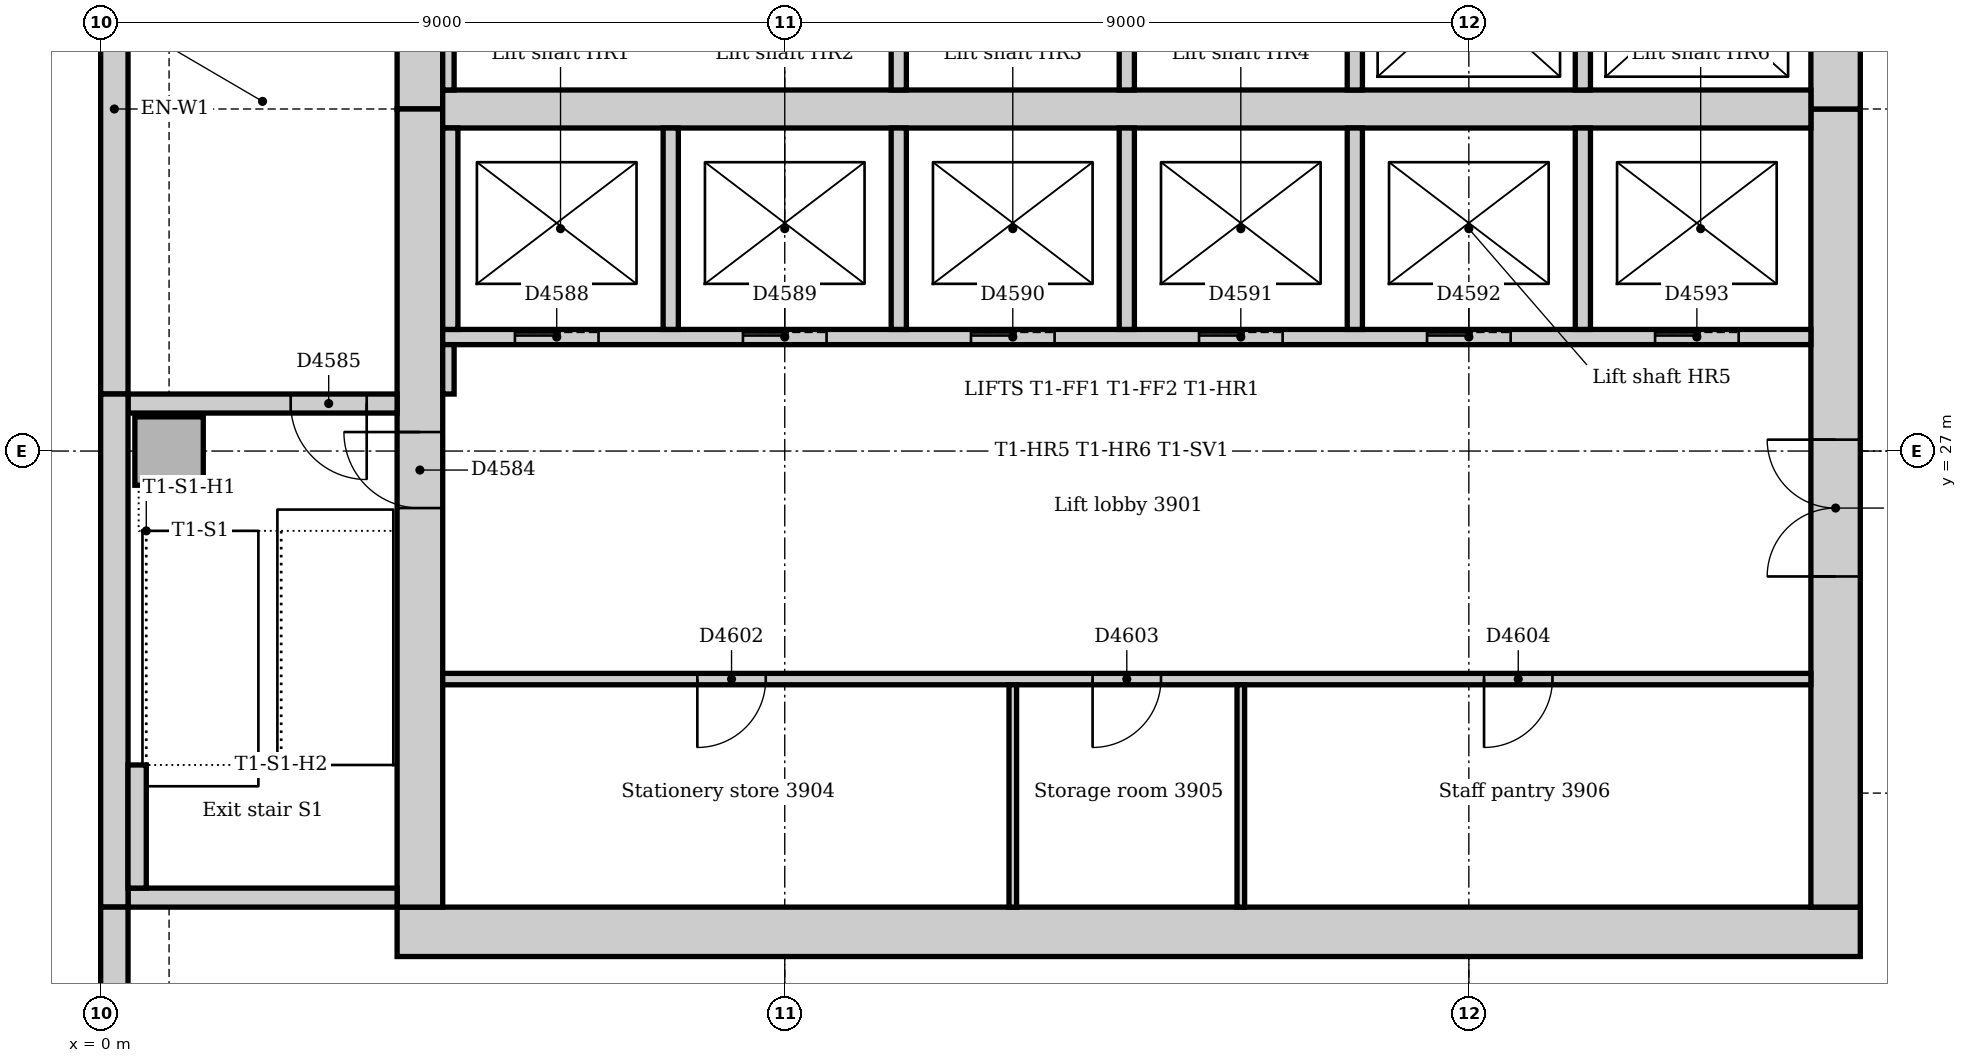
"""IFC4 building model, lengths in metres.
Left out: names, types, materials, properties, quantities, classifications, styles, units other than length and angle.
Written with IfcOpenShell. Run it as: python <this file> out.ifc"""

import sys

from ifc_helpers import new_model, si_unit, direction, frame, frame_2d, origin, origin_2d, place, context, subcontext, project, spatial, rectangle, extrude, element, fill, save


model = new_model("IFC4")
c1 = context("Model", 3, precision=1e-05, world=origin(), true_north=direction((0.0, 1.0)))
c2 = subcontext(c1, "Body", "Model", "MODEL_VIEW")
j1 = project(units=[si_unit("LENGTHUNIT", "METRE"), si_unit("PLANEANGLEUNIT", "RADIAN")], contexts=[c1])
p1 = place(None, origin())
s1 = spatial("IfcSite", under=j1, at=p1, CompositionType="ELEMENT")
p2 = place(p1, origin())
s2 = spatial("IfcBuilding", under=s1, at=p2, CompositionType="ELEMENT")
p3 = place(p2, frame((0.0, 0.0, 165.0)))
s3 = spatial("IfcBuildingStorey", under=s2, at=p3, CompositionType="ELEMENT", Elevation=165.0)
p4 = place(p3, frame((3.9, 20.675, 0.0), z_axis=(0.0, 0.0, 1.0), x_axis=(1.0, 0.0, 0.0)))
e1 = element("IfcWall", 1, at=p4, inside=s3, PredefinedType="SOLIDWALL", context=c2, shape_type="SweptSolid", body=[
    extrude(rectangle(XDim=19.25, YDim=0.65, at=frame_2d((9.625, 0.0))), origin(), (0.0, 0.0, 1.0), 4.0),
])
p5 = place(p3, frame((22.825, 21.0, 0.0), z_axis=(0.0, 0.0, 1.0), x_axis=(0.0, 1.0, 0.0)))
e2 = element("IfcWall", 2, at=p5, inside=s3, PredefinedType="SOLIDWALL", context=c2, shape_type="SweptSolid", body=[
    extrude(rectangle(XDim=10.5, YDim=0.65, at=frame_2d((5.25, 0.0))), origin(), (0.0, 0.0, 1.0), 4.0),
])
p6 = place(p5, frame((4.35, 0.0, 0.0)))
e3 = element("IfcOpeningElement", 3, at=p6, cuts=e2, PredefinedType="OPENING", context=c2, shape_type="SweptSolid", body=[
    extrude(rectangle(XDim=1.8, YDim=2.1, at=frame_2d((0.9, 1.05))), frame((0.0, 0.335, 0.0), z_axis=(0.0, -1.0, 0.0), x_axis=(1.0, 0.0, 0.0)), (0.0, 0.0, 1.0), 0.67),
])
p7 = place(p3, frame((22.825, 31.5, 0.0), z_axis=(0.0, 0.0, 1.0), x_axis=(0.0, 1.0, 0.0)))
e4 = element("IfcWall", 4, at=p7, inside=s3, PredefinedType="SOLIDWALL", context=c2, shape_type="SweptSolid", body=[
    extrude(rectangle(XDim=10.5, YDim=0.65, at=frame_2d((5.25, 0.0))), origin(), (0.0, 0.0, 1.0), 4.0),
])
p8 = place(p7, frame((3.15, 0.0, 0.0)))
e5 = element("IfcOpeningElement", 5, at=p8, cuts=e4, PredefinedType="OPENING", context=c2, shape_type="SweptSolid", body=[
    extrude(rectangle(XDim=1.0, YDim=2.1, at=frame_2d((0.5, 1.05))), frame((0.0, 0.335, 0.0), z_axis=(0.0, -1.0, 0.0), x_axis=(1.0, 0.0, 0.0)), (0.0, 0.0, 1.0), 0.67),
])
p9 = place(p7, frame((5.2, 0.0, 0.0)))
e6 = element("IfcOpeningElement", 6, at=p9, cuts=e4, PredefinedType="OPENING", context=c2, shape_type="SweptSolid", body=[
    extrude(rectangle(XDim=1.0, YDim=2.1, at=frame_2d((0.5, 1.05))), frame((0.0, 0.335, 0.0), z_axis=(0.0, -1.0, 0.0), x_axis=(1.0, 0.0, 0.0)), (0.0, 0.0, 1.0), 0.67),
])
p10 = place(p3, frame((4.2, 42.0, 0.0), z_axis=(0.0, 0.0, 1.0), x_axis=(0.0, -1.0, 0.0)))
e7 = element("IfcWall", 7, at=p10, inside=s3, PredefinedType="SOLIDWALL", context=c2, shape_type="SweptSolid", body=[
    extrude(rectangle(XDim=10.5, YDim=0.6, at=frame_2d((5.25, 0.0))), origin(), (0.0, 0.0, 1.0), 4.0),
])
p11 = place(p10, frame((5.3, 0.0, 0.0)))
e8 = element("IfcOpeningElement", 8, at=p11, cuts=e7, PredefinedType="OPENING", context=c2, shape_type="SweptSolid", body=[
    extrude(rectangle(XDim=1.0, YDim=2.1, at=frame_2d((0.5, 1.05))), frame((0.0, 0.31, 0.0), z_axis=(0.0, -1.0, 0.0), x_axis=(1.0, 0.0, 0.0)), (0.0, 0.0, 1.0), 0.62),
])
p12 = place(p3, frame((4.2, 31.5, 0.0), z_axis=(0.0, 0.0, 1.0), x_axis=(0.0, -1.0, 0.0)))
e9 = element("IfcWall", 9, at=p12, inside=s3, PredefinedType="SOLIDWALL", context=c2, shape_type="SweptSolid", body=[
    extrude(rectangle(XDim=10.5, YDim=0.6, at=frame_2d((5.25, 0.0))), origin(), (0.0, 0.0, 1.0), 4.0),
])
p13 = place(p12, frame((4.25, 0.0, 0.0)))
e10 = element("IfcOpeningElement", 10, at=p13, cuts=e9, PredefinedType="OPENING", context=c2, shape_type="SweptSolid", body=[
    extrude(rectangle(XDim=1.0, YDim=2.1, at=frame_2d((0.5, 1.05))), frame((0.0, 0.31, 0.0), z_axis=(0.0, -1.0, 0.0), x_axis=(1.0, 0.0, 0.0)), (0.0, 0.0, 1.0), 0.62),
])
p14 = place(p3, frame((4.5, 31.5, 0.0), z_axis=(0.0, 0.0, 1.0), x_axis=(1.0, 0.0, 0.0)))
e11 = element("IfcWall", 11, at=p14, inside=s3, PredefinedType="SOLIDWALL", context=c2, shape_type="SweptSolid", body=[
    extrude(rectangle(XDim=18.0, YDim=0.5, at=frame_2d((9.0, 0.0))), origin(), (0.0, 0.0, 1.0), 4.0),
])
p15 = place(p3, frame((0.36, 21.125, 0.0), z_axis=(0.0, 0.0, 1.0), x_axis=(1.0, 0.0, 0.0)))
e12 = element("IfcWall", 12, at=p15, inside=s3, PredefinedType="SOLIDWALL", context=c2, shape_type="SweptSolid", body=[
    extrude(rectangle(XDim=3.54, YDim=0.25, at=frame_2d((1.77, 0.0))), origin(), (0.0, 0.0, 1.0), 4.0),
])
p16 = place(p3, frame((3.9, 27.625, 0.0), z_axis=(0.0, 0.0, 1.0), x_axis=(-1.0, 0.0, 0.0)))
e13 = element("IfcWall", 13, at=p16, inside=s3, PredefinedType="SOLIDWALL", context=c2, shape_type="SweptSolid", body=[
    extrude(rectangle(XDim=3.54, YDim=0.25, at=frame_2d((1.77, 0.0))), origin(), (0.0, 0.0, 1.0), 4.0),
])
p17 = place(p16, frame((0.4, 0.0, 0.0)))
e14 = element("IfcOpeningElement", 14, at=p17, cuts=e13, PredefinedType="OPENING", context=c2, shape_type="SweptSolid", body=[
    extrude(rectangle(XDim=1.0, YDim=2.1, at=frame_2d((0.5, 1.05))), frame((0.0, 0.135, 0.0), z_axis=(0.0, -1.0, 0.0), x_axis=(1.0, 0.0, 0.0)), (0.0, 0.0, 1.0), 0.27),
])
p18 = place(p3, frame((0.9, 27.0, 0.0), z_axis=(0.0, 0.0, 1.0), x_axis=(1.0, 0.0, 0.0)))
e15 = element("IfcColumn", 15, at=p18, inside=s3, PredefinedType="COLUMN", context=c2, shape_type="SweptSolid", body=[
    extrude(rectangle(XDim=0.9, YDim=0.9, at=origin_2d()), origin(), (0.0, 0.0, 1.0), 4.0),
])
p19 = place(p3, frame((0.18, 35.25, 0.0), z_axis=(0.0, 0.0, 1.0), x_axis=(0.0, -1.0, 0.0)))
e16 = element("IfcWall", 16, at=p19, inside=s3, PredefinedType="STANDARD", context=c2, shape_type="SweptSolid", body=[
    extrude(rectangle(XDim=7.5, YDim=0.36, at=frame_2d((3.75, 0.0))), origin(), (0.0, 0.0, 1.0), 3.85),
])
p20 = place(p3, frame((0.18, 27.75, 0.0), z_axis=(0.0, 0.0, 1.0), x_axis=(0.0, -1.0, 0.0)))
e17 = element("IfcWall", 17, at=p20, inside=s3, PredefinedType="STANDARD", context=c2, shape_type="SweptSolid", body=[
    extrude(rectangle(XDim=6.75, YDim=0.36, at=frame_2d((3.375, 0.0))), origin(), (0.0, 0.0, 1.0), 3.85),
])
p21 = place(p3, frame((0.18, 21.0, 0.0), z_axis=(0.0, 0.0, 1.0), x_axis=(0.0, -1.0, 0.0)))
e18 = element("IfcWall", 18, at=p21, inside=s3, PredefinedType="STANDARD", context=c2, shape_type="SweptSolid", body=[
    extrude(rectangle(XDim=7.757, YDim=0.36, at=frame_2d((3.879, 0.0))), origin(), (0.0, 0.0, 1.0), 3.85),
])
p22 = place(p21, frame((1.35, 0.0, 0.9)))
e19 = element("IfcOpeningElement", 19, at=p22, cuts=e18, PredefinedType="OPENING", context=c2, shape_type="SweptSolid", body=[
    extrude(rectangle(XDim=3.3, YDim=1.6, at=frame_2d((1.65, 0.8))), frame((0.0, 0.19, 0.0), z_axis=(0.0, -1.0, 0.0), x_axis=(1.0, 0.0, 0.0)), (0.0, 0.0, 1.0), 0.38),
])
p23 = place(p3, frame((0.48, 21.25, 0.0), z_axis=(0.0, 0.0, 1.0), x_axis=(0.0, 1.0, 0.0)))
e20 = element("IfcWall", 20, at=p23, inside=s3, PredefinedType="STANDARD", context=c2, shape_type="SweptSolid", body=[
    extrude(rectangle(XDim=1.62, YDim=0.24, at=frame_2d((0.81, 0.0))), origin(), (0.0, 0.0, 1.0), 4.0),
])
p24 = place(p3, frame((4.5, 28.5, 0.0), z_axis=(0.0, 0.0, 1.0), x_axis=(1.0, 0.0, 0.0)))
e21 = element("IfcWall", 21, at=p24, inside=s3, PredefinedType="PARTITIONING", context=c2, shape_type="SweptSolid", body=[
    extrude(rectangle(XDim=18.0, YDim=0.2, at=frame_2d((9.0, 0.0))), origin(), (0.0, 0.0, 1.0), 3.85),
])
p25 = place(p24, frame((0.95, 0.0, 0.0)))
e22 = element("IfcOpeningElement", 22, at=p25, cuts=e21, PredefinedType="OPENING", context=c2, shape_type="SweptSolid", body=[
    extrude(rectangle(XDim=1.1, YDim=2.1, at=frame_2d((0.55, 1.05))), frame((0.0, 0.11, 0.0), z_axis=(0.0, -1.0, 0.0), x_axis=(1.0, 0.0, 0.0)), (0.0, 0.0, 1.0), 0.22),
])
p26 = place(p24, frame((3.95, 0.0, 0.0)))
e23 = element("IfcOpeningElement", 23, at=p26, cuts=e21, PredefinedType="OPENING", context=c2, shape_type="SweptSolid", body=[
    extrude(rectangle(XDim=1.1, YDim=2.1, at=frame_2d((0.55, 1.05))), frame((0.0, 0.11, 0.0), z_axis=(0.0, -1.0, 0.0), x_axis=(1.0, 0.0, 0.0)), (0.0, 0.0, 1.0), 0.22),
])
p27 = place(p24, frame((6.95, 0.0, 0.0)))
e24 = element("IfcOpeningElement", 24, at=p27, cuts=e21, PredefinedType="OPENING", context=c2, shape_type="SweptSolid", body=[
    extrude(rectangle(XDim=1.1, YDim=2.1, at=frame_2d((0.55, 1.05))), frame((0.0, 0.11, 0.0), z_axis=(0.0, -1.0, 0.0), x_axis=(1.0, 0.0, 0.0)), (0.0, 0.0, 1.0), 0.22),
])
p28 = place(p24, frame((9.95, 0.0, 0.0)))
e25 = element("IfcOpeningElement", 25, at=p28, cuts=e21, PredefinedType="OPENING", context=c2, shape_type="SweptSolid", body=[
    extrude(rectangle(XDim=1.1, YDim=2.1, at=frame_2d((0.55, 1.05))), frame((0.0, 0.11, 0.0), z_axis=(0.0, -1.0, 0.0), x_axis=(1.0, 0.0, 0.0)), (0.0, 0.0, 1.0), 0.22),
])
p29 = place(p24, frame((12.95, 0.0, 0.0)))
e26 = element("IfcOpeningElement", 26, at=p29, cuts=e21, PredefinedType="OPENING", context=c2, shape_type="SweptSolid", body=[
    extrude(rectangle(XDim=1.1, YDim=2.1, at=frame_2d((0.55, 1.05))), frame((0.0, 0.11, 0.0), z_axis=(0.0, -1.0, 0.0), x_axis=(1.0, 0.0, 0.0)), (0.0, 0.0, 1.0), 0.22),
])
p30 = place(p24, frame((15.95, 0.0, 0.0)))
e27 = element("IfcOpeningElement", 27, at=p30, cuts=e21, PredefinedType="OPENING", context=c2, shape_type="SweptSolid", body=[
    extrude(rectangle(XDim=1.1, YDim=2.1, at=frame_2d((0.55, 1.05))), frame((0.0, 0.11, 0.0), z_axis=(0.0, -1.0, 0.0), x_axis=(1.0, 0.0, 0.0)), (0.0, 0.0, 1.0), 0.22),
])
for number, where, z_axis, x_axis in (
    (28, (10.5, 28.6, 0.0), (0.0, 0.0, 1.0), (0.0, 1.0, 0.0)),
    (29, (10.5, 31.75, 0.0), (0.0, 0.0, 1.0), (0.0, 1.0, 0.0)),
    (30, (13.5, 28.6, 0.0), (0.0, 0.0, 1.0), (0.0, 1.0, 0.0)),
    (31, (13.5, 31.75, 0.0), (0.0, 0.0, 1.0), (0.0, 1.0, 0.0)),
    (32, (16.5, 28.6, 0.0), (0.0, 0.0, 1.0), (0.0, 1.0, 0.0)),
    (33, (16.5, 31.75, 0.0), (0.0, 0.0, 1.0), (0.0, 1.0, 0.0)),
    (34, (19.5, 28.6, 0.0), (0.0, 0.0, 1.0), (0.0, 1.0, 0.0)),
    (35, (19.5, 31.75, 0.0), (0.0, 0.0, 1.0), (0.0, 1.0, 0.0)),
    (36, (4.6, 28.6, 0.0), (0.0, 0.0, 1.0), (0.0, 1.0, 0.0)),
    (37, (7.5, 28.6, 0.0), (0.0, 0.0, 1.0), (0.0, 1.0, 0.0)),
):
    element("IfcWall", number, at=place(p3, frame(where, z_axis=z_axis, x_axis=x_axis)), inside=s3, PredefinedType="PARTITIONING", context=c2, shape_type="SweptSolid", body=[
        extrude(rectangle(XDim=2.65, YDim=0.2, at=frame_2d((1.325, 0.0))), origin(), (0.0, 0.0, 1.0), 3.85),
    ])
p31 = place(p3, frame((4.5, 24.0, 0.0), z_axis=(0.0, 0.0, 1.0), x_axis=(1.0, 0.0, 0.0)))
e38 = element("IfcWall", 38, at=p31, inside=s3, PredefinedType="PARTITIONING", context=c2, shape_type="SweptSolid", body=[
    extrude(rectangle(XDim=18.0, YDim=0.15, at=frame_2d((9.0, 0.0))), origin(), (0.0, 0.0, 1.0), 3.85),
])
p32 = place(p31, frame((3.35, 0.0, 0.0)))
e39 = element("IfcOpeningElement", 39, at=p32, cuts=e38, PredefinedType="OPENING", context=c2, shape_type="SweptSolid", body=[
    extrude(rectangle(XDim=0.9, YDim=2.1, at=frame_2d((0.45, 1.05))), frame((0.0, 0.085, 0.0), z_axis=(0.0, -1.0, 0.0), x_axis=(1.0, 0.0, 0.0)), (0.0, 0.0, 1.0), 0.17),
])
p33 = place(p31, frame((8.55, 0.0, 0.0)))
e40 = element("IfcOpeningElement", 40, at=p33, cuts=e38, PredefinedType="OPENING", context=c2, shape_type="SweptSolid", body=[
    extrude(rectangle(XDim=0.9, YDim=2.1, at=frame_2d((0.45, 1.05))), frame((0.0, 0.085, 0.0), z_axis=(0.0, -1.0, 0.0), x_axis=(1.0, 0.0, 0.0)), (0.0, 0.0, 1.0), 0.17),
])
p34 = place(p31, frame((13.7, 0.0, 0.0)))
e41 = element("IfcOpeningElement", 41, at=p34, cuts=e38, PredefinedType="OPENING", context=c2, shape_type="SweptSolid", body=[
    extrude(rectangle(XDim=0.9, YDim=2.1, at=frame_2d((0.45, 1.05))), frame((0.0, 0.085, 0.0), z_axis=(0.0, -1.0, 0.0), x_axis=(1.0, 0.0, 0.0)), (0.0, 0.0, 1.0), 0.17),
])
p35 = place(p3, frame((4.575, 31.75, 0.0), z_axis=(0.0, 0.0, 1.0), x_axis=(0.0, 1.0, 0.0)))
e42 = element("IfcWall", 42, at=p35, inside=s3, PredefinedType="PARTITIONING", context=c2, shape_type="SweptSolid", body=[
    extrude(rectangle(XDim=2.675, YDim=0.15, at=frame_2d((1.337, 0.0))), origin(), (0.0, 0.0, 1.0), 3.85),
])
p36 = place(p3, frame((4.575, 27.75, 0.0), z_axis=(0.0, 0.0, 1.0), x_axis=(0.0, 1.0, 0.0)))
e43 = element("IfcWall", 43, at=p36, inside=s3, PredefinedType="PARTITIONING", context=c2, shape_type="SweptSolid", body=[
    extrude(rectangle(XDim=0.65, YDim=0.15, at=frame_2d((0.325, 0.0))), origin(), (0.0, 0.0, 1.0), 3.85),
])
for number, where, z_axis, x_axis in (
    (44, (12.0, 21.0, 0.0), (0.0, 0.0, 1.0), (0.0, 1.0, 0.0)),
    (45, (15.0, 21.0, 0.0), (0.0, 0.0, 1.0), (0.0, 1.0, 0.0)),
):
    element("IfcWall", number, at=place(p3, frame(where, z_axis=z_axis, x_axis=x_axis)), inside=s3, PredefinedType="PARTITIONING", context=c2, shape_type="SweptSolid", body=[
        extrude(rectangle(XDim=2.925, YDim=0.1, at=frame_2d((1.462, 0.0))), origin(), (0.0, 0.0, 1.0), 3.85),
    ])
p37 = place(p13, frame((1.0, 0.0, 0.0), z_axis=(0.0, 0.0, 1.0), x_axis=(-1.0, 0.0, 0.0)))
e46 = element("IfcDoor", 46, at=p37, inside=s3, OperationType="SINGLE_SWING_RIGHT", PredefinedType="DOOR", context=c2, shape_type="SweptSolid", body=[
    extrude(rectangle(XDim=1.0, YDim=2.1, at=frame_2d((0.5, 1.05))), frame((0.0, 0.025, 0.0), z_axis=(0.0, -1.0, 0.0), x_axis=(1.0, 0.0, 0.0)), (0.0, 0.0, 1.0), 0.05),
])
fill(e10, e46)
p38 = place(p17, origin())
e47 = element("IfcDoor", 47, at=p38, inside=s3, OperationType="SINGLE_SWING_LEFT", PredefinedType="DOOR", context=c2, shape_type="SweptSolid", body=[
    extrude(rectangle(XDim=1.0, YDim=2.1, at=frame_2d((0.5, 1.05))), frame((0.0, 0.025, 0.0), z_axis=(0.0, -1.0, 0.0), x_axis=(1.0, 0.0, 0.0)), (0.0, 0.0, 1.0), 0.05),
])
fill(e14, e47)
p39 = place(p25, origin())
e48 = element("IfcDoor", 48, at=p39, inside=s3, OperationType="SLIDING_TO_LEFT", PredefinedType="DOOR", context=c2, shape_type="SweptSolid", body=[
    extrude(rectangle(XDim=1.1, YDim=2.1, at=frame_2d((0.55, 1.05))), frame((0.0, 0.025, 0.0), z_axis=(0.0, -1.0, 0.0), x_axis=(1.0, 0.0, 0.0)), (0.0, 0.0, 1.0), 0.05),
])
fill(e22, e48)
p40 = place(p26, origin())
e49 = element("IfcDoor", 49, at=p40, inside=s3, OperationType="SLIDING_TO_LEFT", PredefinedType="DOOR", context=c2, shape_type="SweptSolid", body=[
    extrude(rectangle(XDim=1.1, YDim=2.1, at=frame_2d((0.55, 1.05))), frame((0.0, 0.025, 0.0), z_axis=(0.0, -1.0, 0.0), x_axis=(1.0, 0.0, 0.0)), (0.0, 0.0, 1.0), 0.05),
])
fill(e23, e49)
p41 = place(p27, origin())
e50 = element("IfcDoor", 50, at=p41, inside=s3, OperationType="SLIDING_TO_LEFT", PredefinedType="DOOR", context=c2, shape_type="SweptSolid", body=[
    extrude(rectangle(XDim=1.1, YDim=2.1, at=frame_2d((0.55, 1.05))), frame((0.0, 0.025, 0.0), z_axis=(0.0, -1.0, 0.0), x_axis=(1.0, 0.0, 0.0)), (0.0, 0.0, 1.0), 0.05),
])
fill(e24, e50)
p42 = place(p28, origin())
e51 = element("IfcDoor", 51, at=p42, inside=s3, OperationType="SLIDING_TO_LEFT", PredefinedType="DOOR", context=c2, shape_type="SweptSolid", body=[
    extrude(rectangle(XDim=1.1, YDim=2.1, at=frame_2d((0.55, 1.05))), frame((0.0, 0.025, 0.0), z_axis=(0.0, -1.0, 0.0), x_axis=(1.0, 0.0, 0.0)), (0.0, 0.0, 1.0), 0.05),
])
fill(e25, e51)
p43 = place(p29, origin())
e52 = element("IfcDoor", 52, at=p43, inside=s3, OperationType="SLIDING_TO_LEFT", PredefinedType="DOOR", context=c2, shape_type="SweptSolid", body=[
    extrude(rectangle(XDim=1.1, YDim=2.1, at=frame_2d((0.55, 1.05))), frame((0.0, 0.025, 0.0), z_axis=(0.0, -1.0, 0.0), x_axis=(1.0, 0.0, 0.0)), (0.0, 0.0, 1.0), 0.05),
])
fill(e26, e52)
p44 = place(p30, origin())
e53 = element("IfcDoor", 53, at=p44, inside=s3, OperationType="SLIDING_TO_LEFT", PredefinedType="DOOR", context=c2, shape_type="SweptSolid", body=[
    extrude(rectangle(XDim=1.1, YDim=2.1, at=frame_2d((0.55, 1.05))), frame((0.0, 0.025, 0.0), z_axis=(0.0, -1.0, 0.0), x_axis=(1.0, 0.0, 0.0)), (0.0, 0.0, 1.0), 0.05),
])
fill(e27, e53)
p45 = place(p6, origin())
e54 = element("IfcDoor", 54, at=p45, inside=s3, OperationType="DOUBLE_DOOR_DOUBLE_SWING", PredefinedType="DOOR", context=c2, shape_type="SweptSolid", body=[
    extrude(rectangle(XDim=1.8, YDim=2.1, at=frame_2d((0.9, 1.05))), frame((0.0, 0.025, 0.0), z_axis=(0.0, -1.0, 0.0), x_axis=(1.0, 0.0, 0.0)), (0.0, 0.0, 1.0), 0.05),
])
fill(e3, e54)
p46 = place(p32, frame((0.9, 0.0, 0.0), z_axis=(0.0, 0.0, 1.0), x_axis=(-1.0, 0.0, 0.0)))
e55 = element("IfcDoor", 55, at=p46, inside=s3, OperationType="SINGLE_SWING_RIGHT", PredefinedType="DOOR", context=c2, shape_type="SweptSolid", body=[
    extrude(rectangle(XDim=0.9, YDim=2.1, at=frame_2d((0.45, 1.05))), frame((0.0, 0.025, 0.0), z_axis=(0.0, -1.0, 0.0), x_axis=(1.0, 0.0, 0.0)), (0.0, 0.0, 1.0), 0.05),
])
fill(e39, e55)
p47 = place(p33, frame((0.9, 0.0, 0.0), z_axis=(0.0, 0.0, 1.0), x_axis=(-1.0, 0.0, 0.0)))
e56 = element("IfcDoor", 56, at=p47, inside=s3, OperationType="SINGLE_SWING_RIGHT", PredefinedType="DOOR", context=c2, shape_type="SweptSolid", body=[
    extrude(rectangle(XDim=0.9, YDim=2.1, at=frame_2d((0.45, 1.05))), frame((0.0, 0.025, 0.0), z_axis=(0.0, -1.0, 0.0), x_axis=(1.0, 0.0, 0.0)), (0.0, 0.0, 1.0), 0.05),
])
fill(e40, e56)
p48 = place(p34, frame((0.9, 0.0, 0.0), z_axis=(0.0, 0.0, 1.0), x_axis=(-1.0, 0.0, 0.0)))
e57 = element("IfcDoor", 57, at=p48, inside=s3, OperationType="SINGLE_SWING_RIGHT", PredefinedType="DOOR", context=c2, shape_type="SweptSolid", body=[
    extrude(rectangle(XDim=0.9, YDim=2.1, at=frame_2d((0.45, 1.05))), frame((0.0, 0.025, 0.0), z_axis=(0.0, -1.0, 0.0), x_axis=(1.0, 0.0, 0.0)), (0.0, 0.0, 1.0), 0.05),
])
fill(e41, e57)
save(model, sys.argv[1])
